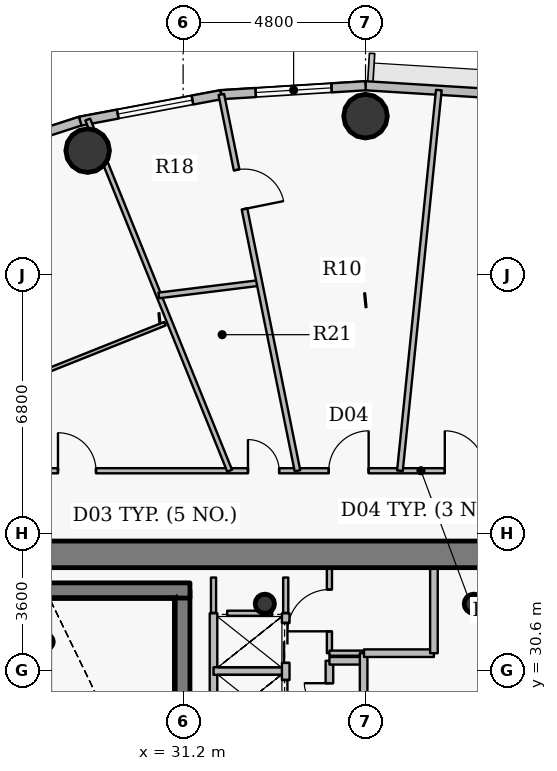
"""IFC4 building model, lengths in metres.
Left out: names, types, materials, properties, quantities, classifications, styles, units other than length and angle.
Written with IfcOpenShell. Run it as: python <this file> out.ifc"""

import sys

from ifc_helpers import new_model, si_unit, direction, frame, frame_2d, origin, origin_2d, place, context, subcontext, project, spatial, rectangle, hollow_circle, extrude, source, transform, mapped, element, fill, save


model = new_model("IFC4")
c1 = context("Model", 3, precision=1e-05, world=origin(), true_north=direction((0.0, 1.0)))
c2 = subcontext(c1, "Body", "Model", "MODEL_VIEW")
j1 = project(units=[si_unit("LENGTHUNIT", "METRE"), si_unit("PLANEANGLEUNIT", "RADIAN")], contexts=[c1])
p1 = place(None, origin())
s1 = spatial("IfcSite", under=j1, at=p1, CompositionType="ELEMENT")
p2 = place(p1, origin())
s2 = spatial("IfcBuilding", under=s1, at=p2, CompositionType="ELEMENT")
p3 = place(p2, frame((0.0, 0.0, 229.05)))
s3 = spatial("IfcBuildingStorey", under=s2, at=p3, CompositionType="ELEMENT", Elevation=229.05)
for number, where, z_axis, x_axis in (
    (1, (38.85, 32.35, 0.0), (0.0, 0.0, 1.0), (1.0, 0.0, 0.0)),
    (2, (33.35, 32.35, 0.0), (0.0, 0.0, 1.0), (1.0, 0.0, 0.0)),
):
    element("IfcColumn", number, at=place(p3, frame(where, z_axis=z_axis, x_axis=x_axis)), inside=s3, PredefinedType="COLUMN", context=c2, shape_type="SweptSolid", body=[
        extrude(hollow_circle(Radius=0.254, WallThickness=0.02, at=origin_2d()), origin(), (0.0, 0.0, 1.0), 3.75),
    ])
p4 = place(p3, frame((31.18, 27.8, 0.0), z_axis=(0.0, 0.0, 1.0), x_axis=(0.0, 1.0, 0.0)))
e3 = element("IfcWall", 3, at=p4, inside=s3, PredefinedType="SHEAR", context=c2, shape_type="SweptSolid", body=[
    extrude(rectangle(XDim=4.9, YDim=0.4, at=frame_2d((2.45, 0.0))), origin(), (0.0, 0.0, 1.0), 3.75),
])
p5 = place(p3, frame((27.28, 32.7, 0.0), z_axis=(0.0, 0.0, 1.0), x_axis=(1.0, 0.0, 0.0)))
e4 = element("IfcWall", 4, at=p5, inside=s3, PredefinedType="SHEAR", context=c2, shape_type="SweptSolid", body=[
    extrude(rectangle(XDim=4.1, YDim=0.4, at=frame_2d((2.05, 0.0))), origin(), (0.0, 0.0, 1.0), 3.75),
])
p6 = place(p3, frame((27.58, 31.35, 0.0), z_axis=(0.0, 0.0, 1.0), x_axis=(1.0, 0.0, 0.0)))
e5 = element("IfcColumn", 5, at=p6, inside=s3, PredefinedType="COLUMN", context=c2, shape_type="SweptSolid", body=[
    extrude(hollow_circle(Radius=0.203, WallThickness=0.016, at=origin_2d()), origin(), (0.0, 0.0, 1.0), 3.75),
])
p7 = place(p3, frame((27.05, 33.65, 0.0), z_axis=(0.0, 0.0, 1.0), x_axis=(1.0, 0.0, 0.0)))
e6 = element("IfcWall", 6, at=p7, inside=s3, PredefinedType="SHEAR", context=c2, shape_type="SweptSolid", body=[
    extrude(rectangle(XDim=17.9, YDim=0.7, at=frame_2d((8.95, 0.0))), origin(), (0.0, 0.0, 1.0), 3.05),
])
p8 = place(p7, frame((13.675, 0.0, 0.0)))
e7 = element("IfcOpeningElement", 7, at=p8, cuts=e6, PredefinedType="OPENING", context=c2, shape_type="SweptSolid", body=[
    extrude(rectangle(XDim=1.15, YDim=2.15, at=origin_2d()), frame((0.575, 0.36, 1.075), z_axis=(0.0, -1.0, 0.0), x_axis=(1.0, 0.0, 0.0)), (0.0, 0.0, 1.0), 0.72),
])
for number, where, z_axis, x_axis in (
    (8, (36.0, 45.18, 0.0), (0.0, 0.0, 1.0), (1.0, 0.0, 0.0)),
    (9, (28.688, 44.273, 0.0), (0.0, 0.0, 1.0), (1.0, 0.0, 0.0)),
):
    element("IfcColumn", number, at=place(p3, frame(where, z_axis=z_axis, x_axis=x_axis)), inside=s3, PredefinedType="COLUMN", context=c2, shape_type="SweptSolid", body=[
        extrude(hollow_circle(Radius=0.575, WallThickness=0.036, at=origin_2d()), origin(), (0.0, 0.0, 1.0), 3.75),
    ])
p9 = place(p3, frame((36.0, 45.98, 0.0), z_axis=(0.0, 0.0, 1.0), x_axis=(0.998108785312, -0.06147237333, 0.0)))
e10 = element("IfcWall", 10, at=p9, inside=s3, PredefinedType="SOLIDWALL", context=c2, shape_type="SweptSolid", body=[
    extrude(rectangle(XDim=3.809, YDim=0.24, at=frame_2d((1.904, 0.0))), origin(), (0.0, 0.0, 1.0), 3.5),
])
p10 = place(p3, frame((32.198, 45.746, 0.0), z_axis=(0.0, 0.0, 1.0), x_axis=(0.998108785312, 0.06147237333, 0.0)))
e11 = element("IfcWall", 11, at=p10, inside=s3, PredefinedType="SOLIDWALL", context=c2, shape_type="SweptSolid", body=[
    extrude(rectangle(XDim=3.809, YDim=0.24, at=frame_2d((1.904, 0.0))), origin(), (0.0, 0.0, 1.0), 3.5),
])
p11 = place(p10, frame((0.913, 0.0, 0.9)))
e12 = element("IfcOpeningElement", 12, at=p11, cuts=e11, PredefinedType="OPENING", context=c2, shape_type="SweptSolid", body=[
    extrude(rectangle(XDim=2.0, YDim=1.75, at=origin_2d()), frame((1.0, 0.13, 0.875), z_axis=(0.0, -1.0, 0.0), x_axis=(1.0, 0.0, 0.0)), (0.0, 0.0, 1.0), 0.26),
])
p12 = place(p3, frame((28.491, 45.049, 0.0), z_axis=(0.0, 0.0, 1.0), x_axis=(0.982784898575, 0.184753465822, 0.0)))
e13 = element("IfcWall", 13, at=p12, inside=s3, PredefinedType="SOLIDWALL", context=c2, shape_type="SweptSolid", body=[
    extrude(rectangle(XDim=3.773, YDim=0.24, at=frame_2d((1.886, 0.0))), origin(), (0.0, 0.0, 1.0), 3.5),
])
p13 = place(p12, frame((1.006, 0.0, 0.9)))
e14 = element("IfcOpeningElement", 14, at=p13, cuts=e13, PredefinedType="OPENING", context=c2, shape_type="SweptSolid", body=[
    extrude(rectangle(XDim=2.0, YDim=1.75, at=origin_2d()), frame((1.0, 0.13, 0.875), z_axis=(0.0, -1.0, 0.0), x_axis=(1.0, 0.0, 0.0)), (0.0, 0.0, 1.0), 0.26),
])
p14 = place(p3, frame((24.969, 43.906, 0.0), z_axis=(0.0, 0.0, 1.0), x_axis=(0.951210789182, 0.308541787354, 0.0)))
e15 = element("IfcWall", 15, at=p14, inside=s3, PredefinedType="SOLIDWALL", context=c2, shape_type="SweptSolid", body=[
    extrude(rectangle(XDim=3.702, YDim=0.24, at=frame_2d((1.851, 0.0))), origin(), (0.0, 0.0, 1.0), 3.5),
])
p15 = place(p3, frame((24.35, 35.85, 0.0), z_axis=(0.0, 0.0, 1.0), x_axis=(1.0, 0.0, 0.0)))
e16 = element("IfcWall", 16, at=p15, inside=s3, PredefinedType="PARTITIONING", context=c2, shape_type="SweptSolid", body=[
    extrude(rectangle(XDim=26.218, YDim=0.135, at=frame_2d((13.109, 0.0))), origin(), (0.0, 0.0, 1.0), 2.935),
])
p16 = place(p15, frame((3.557, 0.0, 0.0)))
e17 = element("IfcOpeningElement", 17, at=p16, cuts=e16, PredefinedType="OPENING", context=c2, shape_type="SweptSolid", body=[
    extrude(rectangle(XDim=1.0, YDim=2.15, at=origin_2d()), frame((0.5, 0.078, 1.075), z_axis=(0.0, -1.0, 0.0), x_axis=(1.0, 0.0, 0.0)), (0.0, 0.0, 1.0), 0.155),
])
p17 = place(p15, frame((22.776, 0.0, 0.0)))
e18 = element("IfcOpeningElement", 18, at=p17, cuts=e16, PredefinedType="OPENING", context=c2, shape_type="SweptSolid", body=[
    extrude(rectangle(XDim=1.0, YDim=2.15, at=origin_2d()), frame((0.5, 0.078, 1.075), z_axis=(0.0, -1.0, 0.0), x_axis=(1.0, 0.0, 0.0)), (0.0, 0.0, 1.0), 0.155),
])
p18 = place(p15, frame((13.736, 0.0, 0.0)))
e19 = element("IfcOpeningElement", 19, at=p18, cuts=e16, PredefinedType="OPENING", context=c2, shape_type="SweptSolid", body=[
    extrude(rectangle(XDim=1.05, YDim=2.15, at=origin_2d()), frame((0.525, 0.078, 1.075), z_axis=(0.0, -1.0, 0.0), x_axis=(1.0, 0.0, 0.0)), (0.0, 0.0, 1.0), 0.155),
])
p19 = place(p15, frame((10.682, 0.0, 0.0)))
e20 = element("IfcOpeningElement", 20, at=p19, cuts=e16, PredefinedType="OPENING", context=c2, shape_type="SweptSolid", body=[
    extrude(rectangle(XDim=1.05, YDim=2.15, at=origin_2d()), frame((0.525, 0.078, 1.075), z_axis=(0.0, -1.0, 0.0), x_axis=(1.0, 0.0, 0.0)), (0.0, 0.0, 1.0), 0.155),
])
p20 = place(p15, frame((8.557, 0.0, 0.0)))
e21 = element("IfcOpeningElement", 21, at=p20, cuts=e16, PredefinedType="OPENING", context=c2, shape_type="SweptSolid", body=[
    extrude(rectangle(XDim=0.82, YDim=2.1, at=origin_2d()), frame((0.41, 0.078, 1.05), z_axis=(0.0, -1.0, 0.0), x_axis=(1.0, 0.0, 0.0)), (0.0, 0.0, 1.0), 0.155),
])
p21 = place(p3, frame((25.961, 37.819, 0.0), z_axis=(0.0, 0.0, 1.0), x_axis=(0.928801505367, 0.370577608105, 0.0)))
e22 = element("IfcWall", 22, at=p21, inside=s3, PredefinedType="PARTITIONING", context=c2, shape_type="SweptSolid", body=[
    extrude(rectangle(XDim=5.126, YDim=0.1, at=frame_2d((2.563, 0.0))), origin(), (0.0, 0.0, 1.0), 2.935),
])
p22 = place(p3, frame((28.691, 45.091, 0.0), z_axis=(0.0, 0.0, 1.0), x_axis=(0.37459385956, -0.927188999277, 0.0)))
e23 = element("IfcWall", 23, at=p22, inside=s3, PredefinedType="PARTITIONING", context=c2, shape_type="SweptSolid", body=[
    extrude(rectangle(XDim=9.967, YDim=0.135, at=frame_2d((4.984, 0.0))), origin(), (0.0, 0.0, 1.0), 2.935),
])
p23 = place(p3, frame((30.561, 40.463, 0.0), z_axis=(0.0, 0.0, 1.0), x_axis=(0.992402619978, 0.123032678023, 0.0)))
e24 = element("IfcWall", 24, at=p23, inside=s3, PredefinedType="PARTITIONING", context=c2, shape_type="SweptSolid", body=[
    extrude(rectangle(XDim=2.669, YDim=0.15, at=frame_2d((1.334, 0.0))), origin(), (0.0, 0.0, 1.0), 3.5),
])
p24 = place(p3, frame((32.0, 24.1, 0.0), z_axis=(0.0, 0.0, 1.0), x_axis=(0.0, 1.0, 0.0)))
e25 = element("IfcWall", 25, at=p24, inside=s3, PredefinedType="PARTITIONING", context=c2, shape_type="SweptSolid", body=[
    extrude(rectangle(XDim=8.0, YDim=0.2, at=frame_2d((4.0, 0.0))), origin(), (0.0, 0.0, 1.0), 3.5),
])
p25 = place(p3, frame((32.0, 30.58, 0.0), z_axis=(0.0, 0.0, 1.0), x_axis=(1.0, 0.0, 0.0)))
e26 = element("IfcWall", 26, at=p25, inside=s3, PredefinedType="PARTITIONING", context=c2, shape_type="SweptSolid", body=[
    extrude(rectangle(XDim=1.9, YDim=0.2, at=frame_2d((0.95, 0.0))), origin(), (0.0, 0.0, 1.0), 3.085),
])
p26 = place(p3, frame((32.206, 45.751, 0.0), z_axis=(0.0, 0.0, 1.0), x_axis=(0.198323299654, -0.980136658234, 0.0)))
e27 = element("IfcWall", 27, at=p26, inside=s3, PredefinedType="PARTITIONING", context=c2, shape_type="SweptSolid", body=[
    extrude(rectangle(XDim=10.102, YDim=0.15, at=frame_2d((5.051, 0.0))), origin(), (0.0, 0.0, 1.0), 2.985),
])
p27 = place(p26, frame((2.025, 0.0, 0.0)))
e28 = element("IfcOpeningElement", 28, at=p27, cuts=e27, PredefinedType="OPENING", context=c2, shape_type="SweptSolid", body=[
    extrude(rectangle(XDim=1.05, YDim=2.15, at=origin_2d()), frame((0.525, 0.085, 1.075), z_axis=(0.0, -1.0, 0.0), x_axis=(1.0, 0.0, 0.0)), (0.0, 0.0, 1.0), 0.17),
])
p28 = place(p3, frame((33.9, 20.7, 0.0), z_axis=(0.0, 0.0, 1.0), x_axis=(0.0, 1.0, 0.0)))
e29 = element("IfcWall", 29, at=p28, inside=s3, PredefinedType="PARTITIONING", context=c2, shape_type="SweptSolid", body=[
    extrude(rectangle(XDim=11.4, YDim=0.2, at=frame_2d((5.7, 0.0))), origin(), (0.0, 0.0, 1.0), 3.085),
])
p29 = place(p28, frame((7.08, 0.0, 0.0)))
e30 = element("IfcOpeningElement", 30, at=p29, cuts=e29, PredefinedType="OPENING", context=c2, shape_type="SweptSolid", body=[
    extrude(rectangle(XDim=1.05, YDim=2.15, at=origin_2d()), frame((0.525, 0.11, 1.075), z_axis=(0.0, -1.0, 0.0), x_axis=(1.0, 0.0, 0.0)), (0.0, 0.0, 1.0), 0.22),
])
p30 = place(p28, frame((8.595, 0.0, 0.0)))
e31 = element("IfcOpeningElement", 31, at=p30, cuts=e29, PredefinedType="OPENING", context=c2, shape_type="SweptSolid", body=[
    extrude(rectangle(XDim=1.05, YDim=2.15, at=origin_2d()), frame((0.525, 0.11, 1.075), z_axis=(0.0, -1.0, 0.0), x_axis=(1.0, 0.0, 0.0)), (0.0, 0.0, 1.0), 0.22),
])
p31 = place(p28, frame((10.095, 0.0, 0.0)))
e32 = element("IfcOpeningElement", 32, at=p31, cuts=e29, PredefinedType="OPENING", context=c2, shape_type="SweptSolid", body=[
    extrude(rectangle(XDim=1.05, YDim=2.15, at=origin_2d()), frame((0.525, 0.11, 1.075), z_axis=(0.0, -1.0, 0.0), x_axis=(1.0, 0.0, 0.0)), (0.0, 0.0, 1.0), 0.22),
])
p32 = place(p3, frame((35.05, 27.25, 0.0), z_axis=(0.0, 0.0, 1.0), x_axis=(0.0, 1.0, 0.0)))
e33 = element("IfcWall", 33, at=p32, inside=s3, PredefinedType="PARTITIONING", context=c2, shape_type="SweptSolid", body=[
    extrude(rectangle(XDim=3.6, YDim=0.2, at=frame_2d((1.8, 0.0))), origin(), (0.0, 0.0, 1.0), 3.5),
])
p33 = place(p32, frame((0.59, 0.0, 0.0)))
e34 = element("IfcOpeningElement", 34, at=p33, cuts=e33, PredefinedType="OPENING", context=c2, shape_type="SweptSolid", body=[
    extrude(rectangle(XDim=0.66, YDim=2.05, at=origin_2d()), frame((0.33, 0.11, 1.025), z_axis=(0.0, -1.0, 0.0), x_axis=(1.0, 0.0, 0.0)), (0.0, 0.0, 1.0), 0.22),
])
p34 = place(p32, frame((2.35, 0.0, 0.0)))
e35 = element("IfcOpeningElement", 35, at=p34, cuts=e33, PredefinedType="OPENING", context=c2, shape_type="SweptSolid", body=[
    extrude(rectangle(XDim=0.66, YDim=2.05, at=origin_2d()), frame((0.33, 0.11, 1.025), z_axis=(0.0, -1.0, 0.0), x_axis=(1.0, 0.0, 0.0)), (0.0, 0.0, 1.0), 0.22),
])
p35 = place(p3, frame((35.05, 30.85, 0.0), z_axis=(0.0, 0.0, 1.0), x_axis=(1.0, 0.0, 0.0)))
e36 = element("IfcWall", 36, at=p35, inside=s3, PredefinedType="PARTITIONING", context=c2, shape_type="SweptSolid", body=[
    extrude(rectangle(XDim=0.9, YDim=0.2, at=frame_2d((0.45, 0.0))), origin(), (0.0, 0.0, 1.0), 3.5),
])
p36 = place(p3, frame((35.05, 31.05, 0.0), z_axis=(0.0, 0.0, 1.0), x_axis=(0.0, 1.0, 0.0)))
e37 = element("IfcWall", 37, at=p36, inside=s3, PredefinedType="PARTITIONING", context=c2, shape_type="SweptSolid", body=[
    extrude(rectangle(XDim=2.25, YDim=0.135, at=frame_2d((1.125, 0.0))), origin(), (0.0, 0.0, 1.0), 3.085),
])
p37 = place(p36, frame((0.575, 0.0, 0.0)))
e38 = element("IfcOpeningElement", 38, at=p37, cuts=e37, PredefinedType="OPENING", context=c2, shape_type="SweptSolid", body=[
    extrude(rectangle(XDim=1.1, YDim=2.15, at=origin_2d()), frame((0.55, 0.078, 1.075), z_axis=(0.0, -1.0, 0.0), x_axis=(1.0, 0.0, 0.0)), (0.0, 0.0, 1.0), 0.155),
])
p38 = place(p3, frame((35.05, 31.05, 0.0), z_axis=(0.0, 0.0, 1.0), x_axis=(1.0, 0.0, 0.0)))
e39 = element("IfcWall", 39, at=p38, inside=s3, PredefinedType="PARTITIONING", context=c2, shape_type="SweptSolid", body=[
    extrude(rectangle(XDim=0.9, YDim=0.135, at=frame_2d((0.45, 0.0))), origin(), (0.0, 0.0, 1.0), 3.5),
])
p39 = place(p3, frame((35.95, 27.25, 0.0), z_axis=(0.0, 0.0, 1.0), x_axis=(0.0, 1.0, 0.0)))
e40 = element("IfcWall", 40, at=p39, inside=s3, PredefinedType="PARTITIONING", context=c2, shape_type="SweptSolid", body=[
    extrude(rectangle(XDim=3.8, YDim=0.2, at=frame_2d((1.9, 0.0))), origin(), (0.0, 0.0, 1.0), 3.5),
])
p40 = place(p3, frame((35.96, 31.05, 0.0), z_axis=(0.0, 0.0, 1.0), x_axis=(1.0, 0.0, 0.0)))
e41 = element("IfcWall", 41, at=p40, inside=s3, PredefinedType="PARTITIONING", context=c2, shape_type="SweptSolid", body=[
    extrude(rectangle(XDim=1.84, YDim=0.2, at=frame_2d((0.92, 0.0))), origin(), (0.0, 0.0, 1.0), 3.5),
])
p41 = place(p3, frame((36.905, 35.85, 0.0), z_axis=(0.0, 0.0, 1.0), x_axis=(0.101745833159, 0.994810426883, 0.0)))
e42 = element("IfcWall", 42, at=p41, inside=s3, PredefinedType="PARTITIONING", context=c2, shape_type="SweptSolid", body=[
    extrude(rectangle(XDim=10.068, YDim=0.15, at=frame_2d((5.034, 0.0))), origin(), (0.0, 0.0, 1.0), 2.985),
])
p42 = place(p3, frame((37.8, 31.05, 0.0), z_axis=(0.0, 0.0, 1.0), x_axis=(0.0, 1.0, 0.0)))
e43 = element("IfcWall", 43, at=p42, inside=s3, PredefinedType="PARTITIONING", context=c2, shape_type="SweptSolid", body=[
    extrude(rectangle(XDim=2.25, YDim=0.2, at=frame_2d((1.125, 0.0))), origin(), (0.0, 0.0, 1.0), 3.085),
])
p43 = place(p3, frame((32.36, 32.1, 0.0), z_axis=(0.0, 0.0, 1.0), x_axis=(1.0, 0.0, 0.0)))
e44 = element("IfcWall", 44, at=p43, inside=s3, PredefinedType="PARTITIONING", context=c2, shape_type="SweptSolid", body=[
    extrude(rectangle(XDim=1.18, YDim=0.135, at=frame_2d((0.59, 0.0))), origin(), (0.0, 0.0, 1.0), 3.085),
])
p44 = place(p3, frame((32.0, 33.04, 0.0), z_axis=(0.0, 0.0, 1.0), x_axis=(0.0, -1.0, 0.0)))
e45 = element("IfcWall", 45, at=p44, inside=s3, PredefinedType="PARTITIONING", context=c2, shape_type="SweptSolid", body=[
    extrude(rectangle(XDim=0.93, YDim=0.135, at=frame_2d((0.465, 0.0))), origin(), (0.0, 0.0, 1.0), 3.035),
])
p45 = place(p3, frame((33.9, 32.11, 0.0), z_axis=(0.0, 0.0, 1.0), x_axis=(0.0, 1.0, 0.0)))
e46 = element("IfcWall", 46, at=p45, inside=s3, PredefinedType="PARTITIONING", context=c2, shape_type="SweptSolid", body=[
    extrude(rectangle(XDim=0.93, YDim=0.135, at=frame_2d((0.465, 0.0))), origin(), (0.0, 0.0, 1.0), 3.085),
])
m1 = source(origin(), c2, "Body", "SweptSolid", [
    extrude(rectangle(XDim=2.0, YDim=1.75, at=origin_2d()), frame((1.0, 0.03, 0.875), z_axis=(0.0, -1.0, 0.0), x_axis=(1.0, 0.0, 0.0)), (0.0, 0.0, 1.0), 0.06),
])
p46 = place(p11, origin())
e47 = element("IfcWindow", 47, at=p46, inside=s3, PartitioningType="DOUBLE_PANEL_VERTICAL", PredefinedType="WINDOW", context=c2, shape_type="MappedRepresentation", body=[
    mapped(m1, transform((0.0, 0.0, 0.0), x_axis=(1.0, 0.0, 0.0), y_axis=(0.0, 1.0, 0.0), z_axis=(0.0, 0.0, 1.0), scale=1.0)),
])
fill(e12, e47)
p47 = place(p13, origin())
e48 = element("IfcWindow", 48, at=p47, inside=s3, PartitioningType="DOUBLE_PANEL_VERTICAL", PredefinedType="WINDOW", context=c2, shape_type="MappedRepresentation", body=[
    mapped(m1, transform((0.0, 0.0, 0.0), x_axis=(1.0, 0.0, 0.0), y_axis=(0.0, 1.0, 0.0), z_axis=(0.0, 0.0, 1.0), scale=1.0)),
])
fill(e14, e48)
m2 = source(origin(), c2, "Body", "SweptSolid", [
    extrude(rectangle(XDim=1.05, YDim=2.15, at=origin_2d()), frame((0.525, 0.025, 1.075), z_axis=(0.0, -1.0, 0.0), x_axis=(1.0, 0.0, 0.0)), (0.0, 0.0, 1.0), 0.05),
])
p48 = place(p30, origin())
e49 = element("IfcDoor", 49, at=p48, inside=s3, OperationType="DOUBLE_DOOR_SLIDING", PredefinedType="USERDEFINED", context=c2, shape_type="MappedRepresentation", body=[
    mapped(m2, transform((0.0, 0.0, 0.0), x_axis=(1.0, 0.0, 0.0), y_axis=(0.0, 1.0, 0.0), z_axis=(0.0, 0.0, 1.0), scale=1.0)),
])
fill(e31, e49)
p49 = place(p31, origin())
e50 = element("IfcDoor", 50, at=p49, inside=s3, OperationType="DOUBLE_DOOR_SLIDING", PredefinedType="USERDEFINED", context=c2, shape_type="MappedRepresentation", body=[
    mapped(m2, transform((0.0, 0.0, 0.0), x_axis=(1.0, 0.0, 0.0), y_axis=(0.0, 1.0, 0.0), z_axis=(0.0, 0.0, 1.0), scale=1.0)),
])
fill(e32, e50)
m3 = source(origin(), c2, "Body", "SweptSolid", [
    extrude(rectangle(XDim=1.0, YDim=2.15, at=origin_2d()), frame((0.5, 0.025, 1.075), z_axis=(0.0, -1.0, 0.0), x_axis=(1.0, 0.0, 0.0)), (0.0, 0.0, 1.0), 0.05),
])
p50 = place(p16, origin())
e51 = element("IfcDoor", 51, at=p50, inside=s3, OperationType="SINGLE_SWING_LEFT", PredefinedType="DOOR", context=c2, shape_type="MappedRepresentation", body=[
    mapped(m3, transform((0.0, 0.0, 0.0), x_axis=(1.0, 0.0, 0.0), y_axis=(0.0, 1.0, 0.0), z_axis=(0.0, 0.0, 1.0), scale=1.0)),
])
fill(e17, e51)
m4 = source(origin(), c2, "Body", "SweptSolid", [
    extrude(rectangle(XDim=0.66, YDim=2.05, at=origin_2d()), frame((0.33, 0.025, 1.025), z_axis=(0.0, -1.0, 0.0), x_axis=(1.0, 0.0, 0.0)), (0.0, 0.0, 1.0), 0.05),
])
p51 = place(p34, origin())
e52 = element("IfcDoor", 52, at=p51, inside=s3, OperationType="SINGLE_SWING_RIGHT", PredefinedType="USERDEFINED", context=c2, shape_type="MappedRepresentation", body=[
    mapped(m4, transform((0.0, 0.0, 0.0), x_axis=(1.0, 0.0, 0.0), y_axis=(0.0, 1.0, 0.0), z_axis=(0.0, 0.0, 1.0), scale=1.0)),
])
fill(e35, e52)
m5 = source(origin(), c2, "Body", "SweptSolid", [
    extrude(rectangle(XDim=1.1, YDim=2.15, at=origin_2d()), frame((0.55, 0.025, 1.075), z_axis=(0.0, -1.0, 0.0), x_axis=(1.0, 0.0, 0.0)), (0.0, 0.0, 1.0), 0.05),
])
p52 = place(p37, origin())
e53 = element("IfcDoor", 53, at=p52, inside=s3, OperationType="SINGLE_SWING_LEFT", PredefinedType="DOOR", context=c2, shape_type="MappedRepresentation", body=[
    mapped(m5, transform((0.0, 0.0, 0.0), x_axis=(1.0, 0.0, 0.0), y_axis=(0.0, 1.0, 0.0), z_axis=(0.0, 0.0, 1.0), scale=1.0)),
])
fill(e38, e53)
m6 = source(origin(), c2, "Body", "SweptSolid", [
    extrude(rectangle(XDim=1.05, YDim=2.15, at=origin_2d()), frame((0.525, 0.025, 1.075), z_axis=(0.0, -1.0, 0.0), x_axis=(1.0, 0.0, 0.0)), (0.0, 0.0, 1.0), 0.05),
])
p53 = place(p18, origin())
e54 = element("IfcDoor", 54, at=p53, inside=s3, OperationType="SINGLE_SWING_LEFT", PredefinedType="DOOR", context=c2, shape_type="MappedRepresentation", body=[
    mapped(m6, transform((0.0, 0.0, 0.0), x_axis=(1.0, 0.0, 0.0), y_axis=(0.0, 1.0, 0.0), z_axis=(0.0, 0.0, 1.0), scale=1.0)),
])
fill(e19, e54)
p54 = place(p19, origin())
e55 = element("IfcDoor", 55, at=p54, inside=s3, OperationType="SINGLE_SWING_RIGHT", PredefinedType="DOOR", context=c2, shape_type="MappedRepresentation", body=[
    mapped(m6, transform((0.0, 0.0, 0.0), x_axis=(1.0, 0.0, 0.0), y_axis=(0.0, 1.0, 0.0), z_axis=(0.0, 0.0, 1.0), scale=1.0)),
])
fill(e20, e55)
m7 = source(origin(), c2, "Body", "SweptSolid", [
    extrude(rectangle(XDim=0.82, YDim=2.1, at=origin_2d()), frame((0.41, 0.025, 1.05), z_axis=(0.0, -1.0, 0.0), x_axis=(1.0, 0.0, 0.0)), (0.0, 0.0, 1.0), 0.05),
])
p55 = place(p20, origin())
e56 = element("IfcDoor", 56, at=p55, inside=s3, OperationType="SINGLE_SWING_LEFT", PredefinedType="DOOR", context=c2, shape_type="MappedRepresentation", body=[
    mapped(m7, transform((0.0, 0.0, 0.0), x_axis=(1.0, 0.0, 0.0), y_axis=(0.0, 1.0, 0.0), z_axis=(0.0, 0.0, 1.0), scale=1.0)),
])
fill(e21, e56)
p56 = place(p27, origin())
e57 = element("IfcDoor", 57, at=p56, inside=s3, OperationType="SINGLE_SWING_RIGHT", PredefinedType="DOOR", context=c2, shape_type="MappedRepresentation", body=[
    mapped(m6, transform((0.0, 0.0, 0.0), x_axis=(1.0, 0.0, 0.0), y_axis=(0.0, 1.0, 0.0), z_axis=(0.0, 0.0, 1.0), scale=1.0)),
])
fill(e28, e57)
save(model, sys.argv[1])
